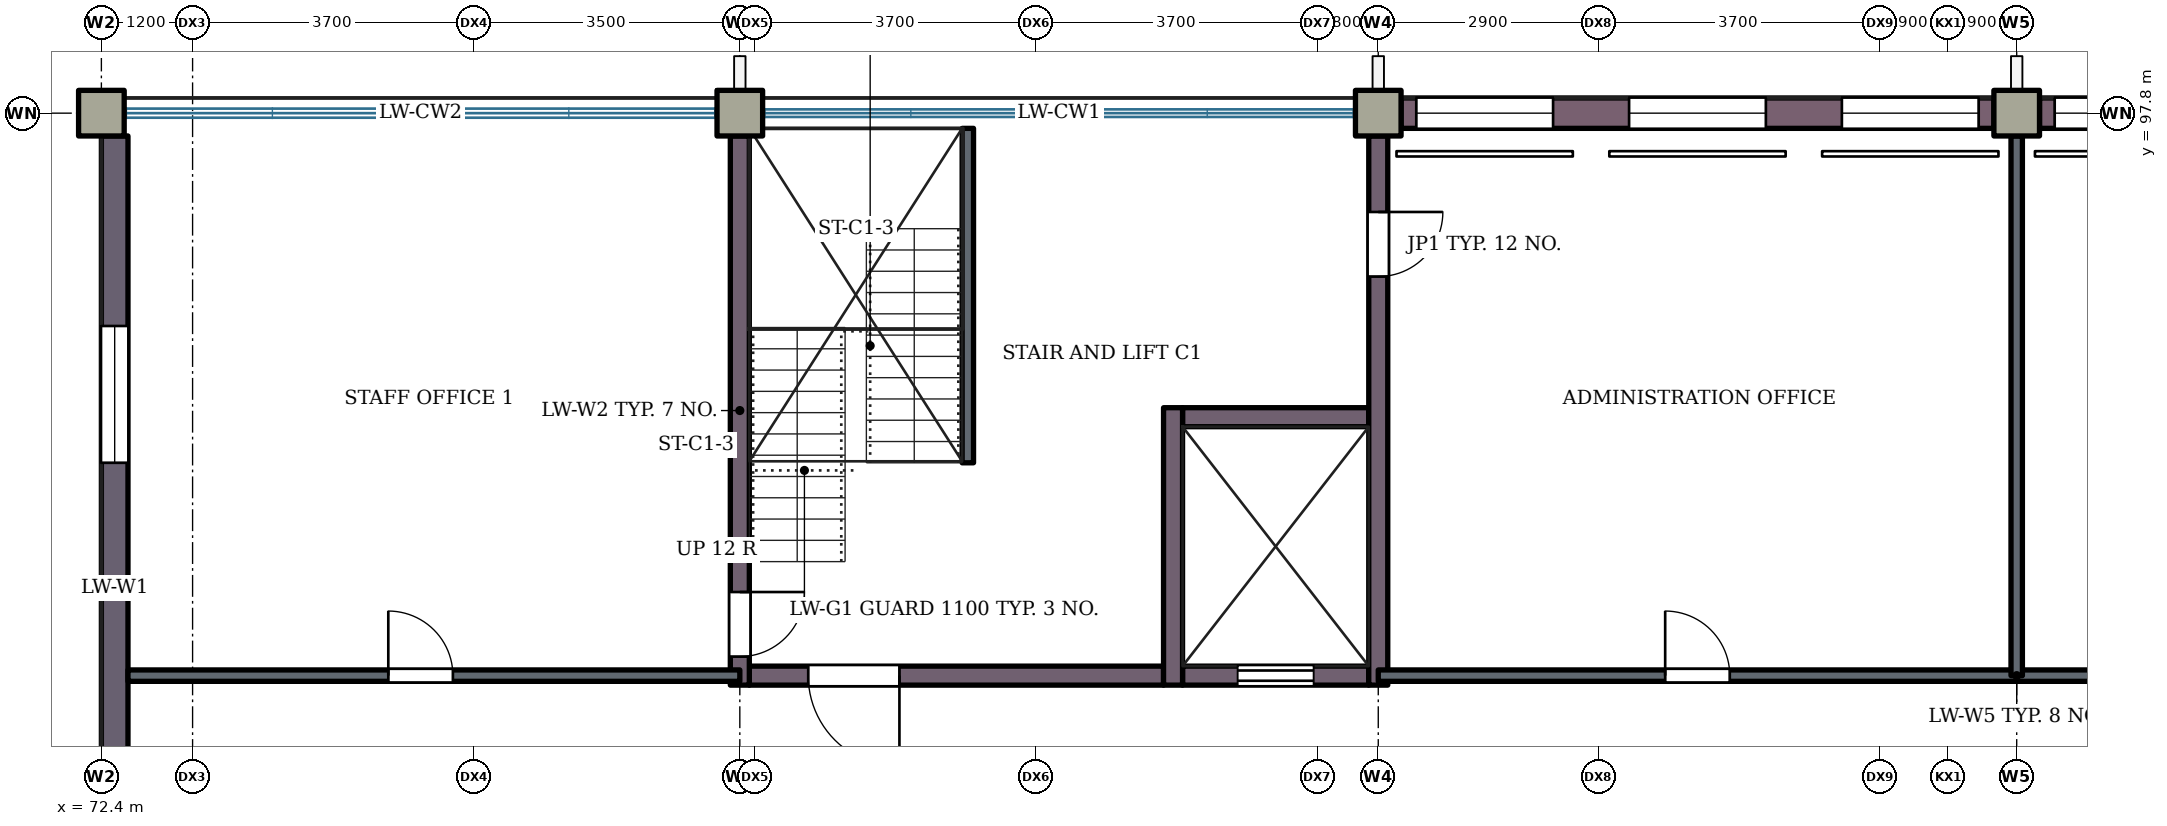
"""IFC4 building model, lengths in metres.
Left out: names, types, materials, properties, quantities, classifications, styles, units other than length and angle.
Written with IfcOpenShell. Run it as: python <this file> out.ifc"""

import sys

from ifc_helpers import new_model, si_unit, direction, frame, frame_2d, origin, origin_2d, place, context, subcontext, project, spatial, rectangle, extrude, element, fill, save


model = new_model("IFC4")
c1 = context("Model", 3, precision=1e-05, world=origin(), true_north=direction((0.0, 1.0)))
c2 = subcontext(c1, "Body", "Model", "MODEL_VIEW")
j1 = project(units=[si_unit("LENGTHUNIT", "METRE"), si_unit("PLANEANGLEUNIT", "RADIAN")], contexts=[c1])
p1 = place(None, origin())
s1 = spatial("IfcSite", under=j1, at=p1, CompositionType="ELEMENT")
p2 = place(p1, origin())
s2 = spatial("IfcBuilding", under=s1, at=p2, CompositionType="ELEMENT")
p3 = place(p2, frame((0.0, 0.0, 12.6)))
s3 = spatial("IfcBuildingStorey", under=s2, at=p3, CompositionType="ELEMENT", Elevation=12.6)
for number, where, z_axis, x_axis in (
    (1, (72.4, 97.8, 0.0), (0.0, 0.0, 1.0), (1.0, 0.0, 0.0)),
    (2, (80.8, 97.8, 0.0), (0.0, 0.0, 1.0), (1.0, 0.0, 0.0)),
    (3, (89.2, 97.8, 0.0), (0.0, 0.0, 1.0), (1.0, 0.0, 0.0)),
    (4, (97.6, 97.8, 0.0), (0.0, 0.0, 1.0), (1.0, 0.0, 0.0)),
):
    element("IfcColumn", number, at=place(p3, frame(where, z_axis=z_axis, x_axis=x_axis)), inside=s3, PredefinedType="COLUMN", context=c2, shape_type="SweptSolid", body=[
        extrude(rectangle(XDim=0.6, YDim=0.6, at=origin_2d()), origin(), (0.0, 0.0, 1.0), 4.2),
    ])
p4 = place(p3, frame((80.925, 90.4, 0.0), z_axis=(0.0, 0.0, 1.0), x_axis=(1.0, 0.0, 0.0)))
e5 = element("IfcWall", 5, at=p4, inside=s3, PredefinedType="SHEAR", context=c2, shape_type="SweptSolid", body=[
    extrude(rectangle(XDim=5.45, YDim=0.25, at=frame_2d((2.725, 0.0))), origin(), (0.0, 0.0, 1.0), 4.2),
])
p5 = place(p4, frame((0.775, 0.0, 0.0)))
e6 = element("IfcOpeningElement", 6, at=p5, cuts=e5, PredefinedType="OPENING", context=c2, shape_type="SweptSolid", body=[
    extrude(rectangle(XDim=1.2, YDim=2.1, at=frame_2d((0.6, 1.05))), frame((0.0, 0.135, 0.0), z_axis=(0.0, -1.0, 0.0), x_axis=(1.0, 0.0, 0.0)), (0.0, 0.0, 1.0), 0.27),
])
p6 = place(p3, frame((86.625, 90.4, 0.0), z_axis=(0.0, 0.0, 1.0), x_axis=(1.0, 0.0, 0.0)))
e7 = element("IfcWall", 7, at=p6, inside=s3, PredefinedType="SHEAR", context=c2, shape_type="SweptSolid", body=[
    extrude(rectangle(XDim=2.45, YDim=0.25, at=frame_2d((1.225, 0.0))), origin(), (0.0, 0.0, 1.0), 4.2),
])
p7 = place(p6, frame((0.725, 0.0, 0.0)))
e8 = element("IfcOpeningElement", 8, at=p7, cuts=e7, PredefinedType="OPENING", context=c2, shape_type="SweptSolid", body=[
    extrude(rectangle(XDim=1.0, YDim=2.1, at=frame_2d((0.5, 1.05))), frame((0.0, 0.135, 0.0), z_axis=(0.0, -1.0, 0.0), x_axis=(1.0, 0.0, 0.0)), (0.0, 0.0, 1.0), 0.27),
])
p8 = place(p3, frame((86.625, 93.8, 0.0), z_axis=(0.0, 0.0, 1.0), x_axis=(1.0, 0.0, 0.0)))
e9 = element("IfcWall", 9, at=p8, inside=s3, PredefinedType="SHEAR", context=c2, shape_type="SweptSolid", body=[
    extrude(rectangle(XDim=2.45, YDim=0.25, at=frame_2d((1.225, 0.0))), origin(), (0.0, 0.0, 1.0), 4.2),
])
p9 = place(p3, frame((72.575, 87.9, 0.0), z_axis=(0.0, 0.0, 1.0), x_axis=(0.0, 1.0, 0.0)))
e10 = element("IfcWall", 10, at=p9, inside=s3, PredefinedType="SHEAR", context=c2, shape_type="SweptSolid", body=[
    extrude(rectangle(XDim=9.6, YDim=0.35, at=frame_2d((4.8, 0.0))), origin(), (0.0, 0.0, 1.0), 4.2),
])
p10 = place(p9, frame((5.3, 0.0, 0.9)))
e11 = element("IfcOpeningElement", 11, at=p10, cuts=e10, PredefinedType="OPENING", context=c2, shape_type="SweptSolid", body=[
    extrude(rectangle(XDim=1.8, YDim=2.1, at=frame_2d((0.9, 1.05))), frame((0.0, 0.185, 0.0), z_axis=(0.0, -1.0, 0.0), x_axis=(1.0, 0.0, 0.0)), (0.0, 0.0, 1.0), 0.37),
])
p11 = place(p3, frame((80.8, 90.275, 0.0), z_axis=(0.0, 0.0, 1.0), x_axis=(0.0, 1.0, 0.0)))
e12 = element("IfcWall", 12, at=p11, inside=s3, PredefinedType="SHEAR", context=c2, shape_type="SweptSolid", body=[
    extrude(rectangle(XDim=7.225, YDim=0.25, at=frame_2d((3.613, 0.0))), origin(), (0.0, 0.0, 1.0), 4.2),
])
p12 = place(p11, frame((0.375, 0.0, 0.0)))
e13 = element("IfcOpeningElement", 13, at=p12, cuts=e12, PredefinedType="OPENING", context=c2, shape_type="SweptSolid", body=[
    extrude(rectangle(XDim=0.85, YDim=2.1, at=frame_2d((0.425, 1.05))), frame((0.0, 0.135, 0.0), z_axis=(0.0, -1.0, 0.0), x_axis=(1.0, 0.0, 0.0)), (0.0, 0.0, 1.0), 0.27),
])
p13 = place(p3, frame((86.5, 90.275, 0.0), z_axis=(0.0, 0.0, 1.0), x_axis=(0.0, 1.0, 0.0)))
e14 = element("IfcWall", 14, at=p13, inside=s3, PredefinedType="SHEAR", context=c2, shape_type="SweptSolid", body=[
    extrude(rectangle(XDim=3.65, YDim=0.25, at=frame_2d((1.825, 0.0))), origin(), (0.0, 0.0, 1.0), 4.2),
])
p14 = place(p3, frame((89.2, 90.275, 0.0), z_axis=(0.0, 0.0, 1.0), x_axis=(0.0, 1.0, 0.0)))
e15 = element("IfcWall", 15, at=p14, inside=s3, PredefinedType="SHEAR", context=c2, shape_type="SweptSolid", body=[
    extrude(rectangle(XDim=7.225, YDim=0.25, at=frame_2d((3.613, 0.0))), origin(), (0.0, 0.0, 1.0), 4.2),
])
p15 = place(p14, frame((5.375, 0.0, 0.0)))
e16 = element("IfcOpeningElement", 16, at=p15, cuts=e15, PredefinedType="OPENING", context=c2, shape_type="SweptSolid", body=[
    extrude(rectangle(XDim=0.85, YDim=2.1, at=frame_2d((0.425, 1.05))), frame((0.0, 0.135, 0.0), z_axis=(0.0, -1.0, 0.0), x_axis=(1.0, 0.0, 0.0)), (0.0, 0.0, 1.0), 0.27),
])
p16 = place(p3, frame((89.5, 97.8, 0.0), z_axis=(0.0, 0.0, 1.0), x_axis=(1.0, 0.0, 0.0)))
e17 = element("IfcWall", 17, at=p16, inside=s3, PredefinedType="SOLIDWALL", context=c2, shape_type="SweptSolid", body=[
    extrude(rectangle(XDim=7.8, YDim=0.4, at=frame_2d((3.9, 0.0))), origin(), (0.0, 0.0, 1.0), 3.32),
])
p17 = place(p16, frame((0.2, 0.0, 1.5)))
e18 = element("IfcOpeningElement", 18, at=p17, cuts=e17, PredefinedType="OPENING", context=c2, shape_type="SweptSolid", body=[
    extrude(rectangle(XDim=1.8, YDim=1.5, at=frame_2d((0.9, 0.75))), frame((0.0, 0.21, 0.0), z_axis=(0.0, -1.0, 0.0), x_axis=(1.0, 0.0, 0.0)), (0.0, 0.0, 1.0), 0.42),
])
p18 = place(p16, frame((3.0, 0.0, 1.5)))
e19 = element("IfcOpeningElement", 19, at=p18, cuts=e17, PredefinedType="OPENING", context=c2, shape_type="SweptSolid", body=[
    extrude(rectangle(XDim=1.8, YDim=1.5, at=frame_2d((0.9, 0.75))), frame((0.0, 0.21, 0.0), z_axis=(0.0, -1.0, 0.0), x_axis=(1.0, 0.0, 0.0)), (0.0, 0.0, 1.0), 0.42),
])
p19 = place(p16, frame((5.8, 0.0, 1.5)))
e20 = element("IfcOpeningElement", 20, at=p19, cuts=e17, PredefinedType="OPENING", context=c2, shape_type="SweptSolid", body=[
    extrude(rectangle(XDim=1.8, YDim=1.5, at=frame_2d((0.9, 0.75))), frame((0.0, 0.21, 0.0), z_axis=(0.0, -1.0, 0.0), x_axis=(1.0, 0.0, 0.0)), (0.0, 0.0, 1.0), 0.42),
])
p20 = place(p3, frame((97.9, 97.8, 0.0), z_axis=(0.0, 0.0, 1.0), x_axis=(1.0, 0.0, 0.0)))
e21 = element("IfcWall", 21, at=p20, inside=s3, PredefinedType="SOLIDWALL", context=c2, shape_type="SweptSolid", body=[
    extrude(rectangle(XDim=7.8, YDim=0.4, at=frame_2d((3.9, 0.0))), origin(), (0.0, 0.0, 1.0), 3.32),
])
p21 = place(p20, frame((0.2, 0.0, 0.6)))
e22 = element("IfcOpeningElement", 22, at=p21, cuts=e21, PredefinedType="OPENING", context=c2, shape_type="SweptSolid", body=[
    extrude(rectangle(XDim=1.8, YDim=2.4, at=frame_2d((0.9, 1.2))), frame((0.0, 0.21, 0.0), z_axis=(0.0, -1.0, 0.0), x_axis=(1.0, 0.0, 0.0)), (0.0, 0.0, 1.0), 0.42),
])
p22 = place(p20, frame((3.0, 0.0, 0.6)))
e23 = element("IfcOpeningElement", 23, at=p22, cuts=e21, PredefinedType="OPENING", context=c2, shape_type="SweptSolid", body=[
    extrude(rectangle(XDim=1.8, YDim=2.4, at=frame_2d((0.9, 1.2))), frame((0.0, 0.21, 0.0), z_axis=(0.0, -1.0, 0.0), x_axis=(1.0, 0.0, 0.0)), (0.0, 0.0, 1.0), 0.42),
])
p23 = place(p20, frame((5.8, 0.0, 0.6)))
e24 = element("IfcOpeningElement", 24, at=p23, cuts=e21, PredefinedType="OPENING", context=c2, shape_type="SweptSolid", body=[
    extrude(rectangle(XDim=1.8, YDim=2.4, at=frame_2d((0.9, 1.2))), frame((0.0, 0.21, 0.0), z_axis=(0.0, -1.0, 0.0), x_axis=(1.0, 0.0, 0.0)), (0.0, 0.0, 1.0), 0.42),
])
p24 = place(p3, frame((72.75, 90.4, 0.0), z_axis=(0.0, 0.0, 1.0), x_axis=(1.0, 0.0, 0.0)))
e25 = element("IfcWall", 25, at=p24, inside=s3, PredefinedType="PARTITIONING", context=c2, shape_type="SweptSolid", body=[
    extrude(rectangle(XDim=8.05, YDim=0.15, at=frame_2d((4.025, 0.0))), origin(), (0.0, 0.0, 1.0), 3.92),
])
p25 = place(p24, frame((3.425, 0.0, 0.0)))
e26 = element("IfcOpeningElement", 26, at=p25, cuts=e25, PredefinedType="OPENING", context=c2, shape_type="SweptSolid", body=[
    extrude(rectangle(XDim=0.85, YDim=2.1, at=frame_2d((0.425, 1.05))), frame((0.0, 0.085, 0.0), z_axis=(0.0, -1.0, 0.0), x_axis=(1.0, 0.0, 0.0)), (0.0, 0.0, 1.0), 0.17),
])
p26 = place(p3, frame((89.2, 90.4, 0.0), z_axis=(0.0, 0.0, 1.0), x_axis=(1.0, 0.0, 0.0)))
e27 = element("IfcWall", 27, at=p26, inside=s3, PredefinedType="PARTITIONING", context=c2, shape_type="SweptSolid", body=[
    extrude(rectangle(XDim=16.8, YDim=0.15, at=frame_2d((8.4, 0.0))), origin(), (0.0, 0.0, 1.0), 3.92),
])
p27 = place(p26, frame((3.775, 0.0, 0.0)))
e28 = element("IfcOpeningElement", 28, at=p27, cuts=e27, PredefinedType="OPENING", context=c2, shape_type="SweptSolid", body=[
    extrude(rectangle(XDim=0.85, YDim=2.1, at=frame_2d((0.425, 1.05))), frame((0.0, 0.085, 0.0), z_axis=(0.0, -1.0, 0.0), x_axis=(1.0, 0.0, 0.0)), (0.0, 0.0, 1.0), 0.17),
])
p28 = place(p26, frame((12.175, 0.0, 0.0)))
e29 = element("IfcOpeningElement", 29, at=p28, cuts=e27, PredefinedType="OPENING", context=c2, shape_type="SweptSolid", body=[
    extrude(rectangle(XDim=0.85, YDim=2.1, at=frame_2d((0.425, 1.05))), frame((0.0, 0.085, 0.0), z_axis=(0.0, -1.0, 0.0), x_axis=(1.0, 0.0, 0.0)), (0.0, 0.0, 1.0), 0.17),
])
p29 = place(p3, frame((97.6, 90.4, 0.0), z_axis=(0.0, 0.0, 1.0), x_axis=(0.0, 1.0, 0.0)))
e30 = element("IfcWall", 30, at=p29, inside=s3, PredefinedType="PARTITIONING", context=c2, shape_type="SweptSolid", body=[
    extrude(rectangle(XDim=7.1, YDim=0.15, at=frame_2d((3.55, 0.0))), origin(), (0.0, 0.0, 1.0), 3.02),
])
p30 = place(p3, frame((83.8, 93.2, 0.0), z_axis=(0.0, 0.0, 1.0), x_axis=(0.0, 1.0, 0.0)))
e31 = element("IfcWall", 31, at=p30, inside=s3, PredefinedType="PARTITIONING", context=c2, shape_type="SweptSolid", body=[
    extrude(rectangle(XDim=4.4, YDim=0.15, at=frame_2d((2.2, 0.0))), origin(), (0.0, 0.0, 1.0), 3.92),
])
p31 = place(p17, origin())
e32 = element("IfcWindow", 32, at=p31, inside=s3, PartitioningType="SINGLE_PANEL", PredefinedType="WINDOW", context=c2, shape_type="SweptSolid", body=[
    extrude(rectangle(XDim=1.8, YDim=1.5, at=frame_2d((0.9, 0.75))), frame((0.0, 0.03, 0.0), z_axis=(0.0, -1.0, 0.0), x_axis=(1.0, 0.0, 0.0)), (0.0, 0.0, 1.0), 0.06),
])
fill(e18, e32)
p32 = place(p18, origin())
e33 = element("IfcWindow", 33, at=p32, inside=s3, PartitioningType="SINGLE_PANEL", PredefinedType="WINDOW", context=c2, shape_type="SweptSolid", body=[
    extrude(rectangle(XDim=1.8, YDim=1.5, at=frame_2d((0.9, 0.75))), frame((0.0, 0.03, 0.0), z_axis=(0.0, -1.0, 0.0), x_axis=(1.0, 0.0, 0.0)), (0.0, 0.0, 1.0), 0.06),
])
fill(e19, e33)
p33 = place(p19, origin())
e34 = element("IfcWindow", 34, at=p33, inside=s3, PartitioningType="SINGLE_PANEL", PredefinedType="WINDOW", context=c2, shape_type="SweptSolid", body=[
    extrude(rectangle(XDim=1.8, YDim=1.5, at=frame_2d((0.9, 0.75))), frame((0.0, 0.03, 0.0), z_axis=(0.0, -1.0, 0.0), x_axis=(1.0, 0.0, 0.0)), (0.0, 0.0, 1.0), 0.06),
])
fill(e20, e34)
p34 = place(p21, origin())
e35 = element("IfcWindow", 35, at=p34, inside=s3, PartitioningType="SINGLE_PANEL", PredefinedType="WINDOW", context=c2, shape_type="SweptSolid", body=[
    extrude(rectangle(XDim=1.8, YDim=2.4, at=frame_2d((0.9, 1.2))), frame((0.0, 0.03, 0.0), z_axis=(0.0, -1.0, 0.0), x_axis=(1.0, 0.0, 0.0)), (0.0, 0.0, 1.0), 0.06),
])
fill(e22, e35)
p35 = place(p10, origin())
e36 = element("IfcWindow", 36, at=p35, inside=s3, PartitioningType="SINGLE_PANEL", PredefinedType="WINDOW", context=c2, shape_type="SweptSolid", body=[
    extrude(rectangle(XDim=1.8, YDim=2.1, at=frame_2d((0.9, 1.05))), frame((0.0, 0.03, 0.0), z_axis=(0.0, -1.0, 0.0), x_axis=(1.0, 0.0, 0.0)), (0.0, 0.0, 1.0), 0.06),
])
fill(e11, e36)
p36 = place(p25, origin())
e37 = element("IfcDoor", 37, at=p36, inside=s3, OperationType="SINGLE_SWING_LEFT", PredefinedType="DOOR", context=c2, shape_type="SweptSolid", body=[
    extrude(rectangle(XDim=0.85, YDim=2.1, at=frame_2d((0.425, 1.05))), frame((0.0, 0.025, 0.0), z_axis=(0.0, -1.0, 0.0), x_axis=(1.0, 0.0, 0.0)), (0.0, 0.0, 1.0), 0.05),
])
fill(e26, e37)
p37 = place(p12, origin())
e38 = element("IfcDoor", 38, at=p37, inside=s3, OperationType="SINGLE_SWING_RIGHT", PredefinedType="DOOR", context=c2, shape_type="SweptSolid", body=[
    extrude(rectangle(XDim=0.85, YDim=2.1, at=frame_2d((0.425, 1.05))), frame((0.0, 0.025, 0.0), z_axis=(0.0, -1.0, 0.0), x_axis=(1.0, 0.0, 0.0)), (0.0, 0.0, 1.0), 0.05),
])
fill(e13, e38)
p38 = place(p27, origin())
e39 = element("IfcDoor", 39, at=p38, inside=s3, OperationType="SINGLE_SWING_LEFT", PredefinedType="DOOR", context=c2, shape_type="SweptSolid", body=[
    extrude(rectangle(XDim=0.85, YDim=2.1, at=frame_2d((0.425, 1.05))), frame((0.0, 0.025, 0.0), z_axis=(0.0, -1.0, 0.0), x_axis=(1.0, 0.0, 0.0)), (0.0, 0.0, 1.0), 0.05),
])
fill(e28, e39)
p39 = place(p15, origin())
e40 = element("IfcDoor", 40, at=p39, inside=s3, OperationType="SINGLE_SWING_RIGHT", PredefinedType="DOOR", context=c2, shape_type="SweptSolid", body=[
    extrude(rectangle(XDim=0.85, YDim=2.1, at=frame_2d((0.425, 1.05))), frame((0.0, 0.025, 0.0), z_axis=(0.0, -1.0, 0.0), x_axis=(1.0, 0.0, 0.0)), (0.0, 0.0, 1.0), 0.05),
])
fill(e16, e40)
p40 = place(p5, origin())
e41 = element("IfcDoor", 41, at=p40, inside=s3, OperationType="SINGLE_SWING_RIGHT", PredefinedType="DOOR", context=c2, shape_type="SweptSolid", body=[
    extrude(rectangle(XDim=1.2, YDim=2.1, at=frame_2d((0.6, 1.05))), frame((0.0, 0.025, 0.0), z_axis=(0.0, -1.0, 0.0), x_axis=(1.0, 0.0, 0.0)), (0.0, 0.0, 1.0), 0.05),
])
fill(e6, e41)
p41 = place(p7, origin())
e42 = element("IfcDoor", 42, at=p41, inside=s3, OperationType="SLIDING_TO_LEFT", PredefinedType="DOOR", context=c2, shape_type="SweptSolid", body=[
    extrude(rectangle(XDim=1.0, YDim=2.1, at=frame_2d((0.5, 1.05))), frame((0.0, 0.025, 0.0), z_axis=(0.0, -1.0, 0.0), x_axis=(1.0, 0.0, 0.0)), (0.0, 0.0, 1.0), 0.05),
])
fill(e8, e42)
save(model, sys.argv[1])
